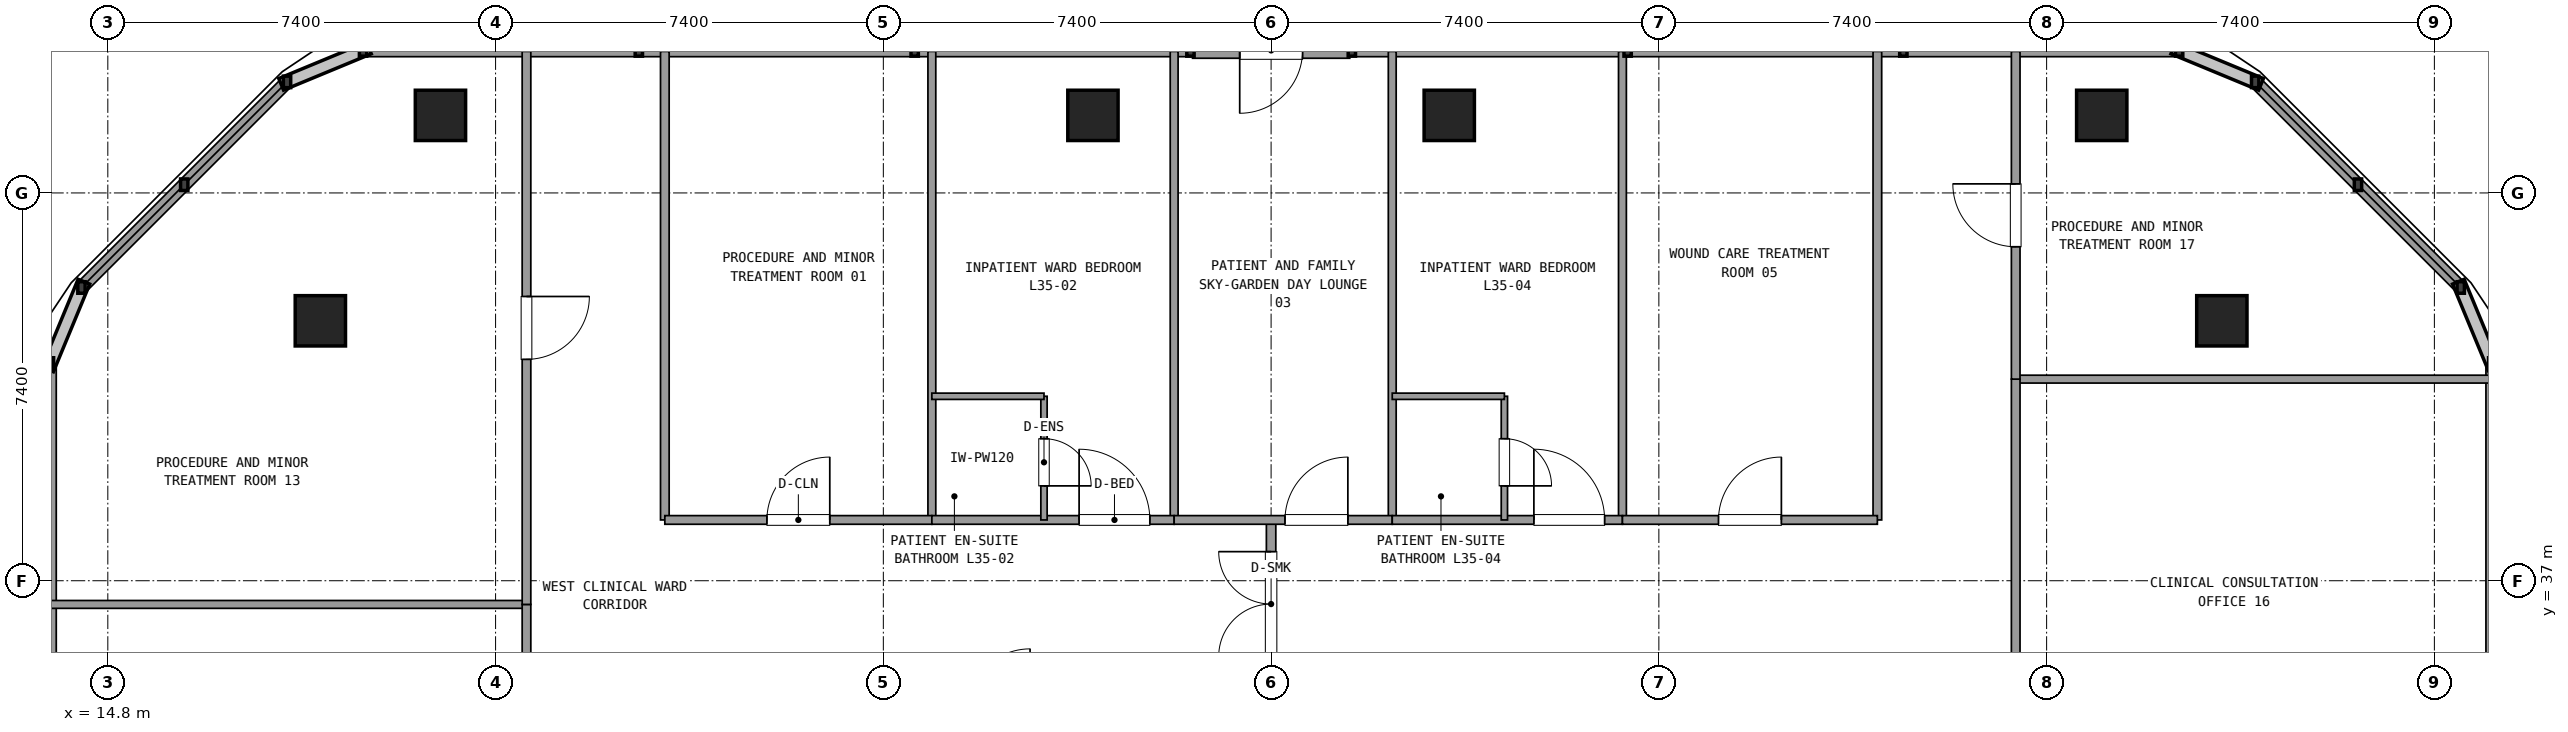
"""IFC4 building model, lengths in metres.
Left out: names, types, materials, properties, quantities, classifications, styles, units other than length and angle.
Written with IfcOpenShell. Run it as: python <this file> out.ifc"""

import sys

from ifc_helpers import new_model, si_unit, direction, frame, frame_2d, origin, origin_2d, place, context, subcontext, project, spatial, rectangle, extrude, element, fill, save


model = new_model("IFC4")
c1 = context("Model", 3, precision=1e-05, world=origin(), true_north=direction((0.0, 1.0)))
c2 = subcontext(c1, "Body", "Model", "MODEL_VIEW")
j1 = project(units=[si_unit("LENGTHUNIT", "METRE"), si_unit("PLANEANGLEUNIT", "RADIAN")], contexts=[c1])
p1 = place(None, origin())
s1 = spatial("IfcSite", under=j1, at=p1, CompositionType="ELEMENT")
p2 = place(p1, origin())
s2 = spatial("IfcBuilding", under=s1, at=p2, CompositionType="ELEMENT")
p3 = place(p2, frame((0.0, 0.0, 138.42)))
s3 = spatial("IfcBuildingStorey", under=s2, at=p3, CompositionType="ELEMENT", Elevation=138.42)
for number, where, z_axis, x_axis in (
    (1, (55.144, 41.96, 0.0), (0.0, 0.0, 1.0), (1.0, 0.0, 0.0)),
    (2, (52.852, 45.88, 0.0), (0.0, 0.0, 1.0), (1.0, 0.0, 0.0)),
    (3, (40.4, 45.88, 0.0), (0.0, 0.0, 1.0), (1.0, 0.0, 0.0)),
    (4, (33.6, 45.88, 0.0), (0.0, 0.0, 1.0), (1.0, 0.0, 0.0)),
    (5, (21.148, 45.88, 0.0), (0.0, 0.0, 1.0), (1.0, 0.0, 0.0)),
    (6, (18.856, 41.96, 0.0), (0.0, 0.0, 1.0), (1.0, 0.0, 0.0)),
):
    element("IfcColumn", number, at=place(p3, frame(where, z_axis=z_axis, x_axis=x_axis)), inside=s3, PredefinedType="COLUMN", context=c2, shape_type="SweptSolid", body=[
        extrude(rectangle(XDim=0.96, YDim=0.96, at=origin_2d()), origin(), (0.0, 0.0, 1.0), 3.6),
    ])
p4 = place(p3, frame((60.304, 10.655, 0.0), z_axis=(0.0, 0.0, 1.0), x_axis=(0.0, 1.0, 0.0)))
e7 = element("IfcWall", 7, at=p4, inside=s3, PredefinedType="SOLIDWALL", context=c2, shape_type="SweptSolid", body=[
    extrude(rectangle(XDim=30.49, YDim=0.24, at=frame_2d((15.245, 0.0))), origin(), (0.0, 0.0, 1.0), 0.85),
])
p5 = place(p3, frame((59.703, 42.596, 0.0), z_axis=(0.0, 0.0, 1.0), x_axis=(-0.707084777957, 0.707128783731, 0.0)))
e8 = element("IfcWall", 8, at=p5, inside=s3, PredefinedType="SOLIDWALL", context=c2, shape_type="SweptSolid", body=[
    extrude(rectangle(XDim=5.548, YDim=0.24, at=frame_2d((2.774, 0.0))), origin(), (0.0, 0.0, 1.0), 0.85),
])
p6 = place(p3, frame((38.501, 47.12, 0.0), z_axis=(0.0, 0.0, 1.0), x_axis=(-1.0, 0.0, 0.0)))
e9 = element("IfcWall", 9, at=p6, inside=s3, PredefinedType="SOLIDWALL", context=c2, shape_type="SweptSolid", body=[
    extrude(rectangle(XDim=3.0, YDim=0.3, at=frame_2d((1.5, 0.0))), origin(), (0.0, 0.0, 1.0), 2.67),
])
p7 = place(p6, frame((0.9, 0.0, 0.0)))
e10 = element("IfcOpeningElement", 10, at=p7, cuts=e9, PredefinedType="OPENING", context=c2, shape_type="SweptSolid", body=[
    extrude(rectangle(XDim=1.2, YDim=2.2, at=frame_2d((0.6, 1.1))), frame((0.0, 0.16, 0.0), z_axis=(0.0, -1.0, 0.0), x_axis=(1.0, 0.0, 0.0)), (0.0, 0.0, 1.0), 0.32),
])
p8 = place(p3, frame((54.329, 47.12, 0.0), z_axis=(0.0, 0.0, 1.0), x_axis=(-1.0, 0.0, 0.0)))
e11 = element("IfcWall", 11, at=p8, inside=s3, PredefinedType="SOLIDWALL", context=c2, shape_type="SweptSolid", body=[
    extrude(rectangle(XDim=15.788, YDim=0.24, at=frame_2d((7.894, 0.0))), origin(), (0.0, 0.0, 1.0), 0.85),
])
p9 = place(p3, frame((35.461, 47.12, 0.0), z_axis=(0.0, 0.0, 1.0), x_axis=(-1.0, 0.0, 0.0)))
e12 = element("IfcWall", 12, at=p9, inside=s3, PredefinedType="SOLIDWALL", context=c2, shape_type="SweptSolid", body=[
    extrude(rectangle(XDim=15.79, YDim=0.24, at=frame_2d((7.895, 0.0))), origin(), (0.0, 0.0, 1.0), 0.85),
])
p10 = place(p3, frame((18.22, 46.519, 0.0), z_axis=(0.0, 0.0, 1.0), x_axis=(-0.707084777957, -0.707128783731, 0.0)))
e13 = element("IfcWall", 13, at=p10, inside=s3, PredefinedType="SOLIDWALL", context=c2, shape_type="SweptSolid", body=[
    extrude(rectangle(XDim=5.548, YDim=0.24, at=frame_2d((2.774, 0.0))), origin(), (0.0, 0.0, 1.0), 0.85),
])
p11 = place(p3, frame((13.696, 41.145, 0.0), z_axis=(0.0, 0.0, 1.0), x_axis=(0.0, -1.0, 0.0)))
e14 = element("IfcWall", 14, at=p11, inside=s3, PredefinedType="SOLIDWALL", context=c2, shape_type="SweptSolid", body=[
    extrude(rectangle(XDim=30.49, YDim=0.24, at=frame_2d((15.245, 0.0))), origin(), (0.0, 0.0, 1.0), 0.85),
])
p12 = place(p3, frame((37.0, 34.95, 0.0), z_axis=(0.0, 0.0, 1.0), x_axis=(0.0, 1.0, 0.0)))
e15 = element("IfcWall", 15, at=p12, inside=s3, PredefinedType="PARTITIONING", context=c2, shape_type="SweptSolid", body=[
    extrude(rectangle(XDim=3.21, YDim=0.18, at=frame_2d((1.605, 0.0))), origin(), (0.0, 0.0, 1.0), 2.61),
])
p13 = place(p12, frame((0.605, 0.0, 0.0)))
e16 = element("IfcOpeningElement", 16, at=p13, cuts=e15, PredefinedType="OPENING", context=c2, shape_type="SweptSolid", body=[
    extrude(rectangle(XDim=2.0, YDim=2.2, at=frame_2d((1.0, 1.1))), frame((0.0, 0.1, 0.0), z_axis=(0.0, -1.0, 0.0), x_axis=(1.0, 0.0, 0.0)), (0.0, 0.0, 1.0), 0.2),
])
for number, where, z_axis, x_axis in (
    (17, (25.43, 38.16, 0.0), (0.0, 0.0, 1.0), (0.0, 1.0, 0.0)),
    (18, (48.57, 38.16, 0.0), (0.0, 0.0, 1.0), (0.0, 1.0, 0.0)),
):
    element("IfcWall", number, at=place(p3, frame(where, z_axis=z_axis, x_axis=x_axis)), inside=s3, PredefinedType="PARTITIONING", context=c2, shape_type="SweptSolid", body=[
        extrude(rectangle(XDim=8.94, YDim=0.165, at=frame_2d((4.47, 0.0))), origin(), (0.0, 0.0, 1.0), 2.61),
    ])
p14 = place(p3, frame((30.526, 38.16, 0.0), z_axis=(0.0, 0.0, 1.0), x_axis=(0.0, 1.0, 0.0)))
e19 = element("IfcWall", 19, at=p14, inside=s3, PredefinedType="PARTITIONING", context=c2, shape_type="SweptSolid", body=[
    extrude(rectangle(XDim=8.94, YDim=0.15, at=frame_2d((4.47, 0.0))), origin(), (0.0, 0.0, 1.0), 2.61),
])
p15 = place(p3, frame((25.43, 38.16, 0.0), z_axis=(0.0, 0.0, 1.0), x_axis=(1.0, 0.0, 0.0)))
e20 = element("IfcWall", 20, at=p15, inside=s3, PredefinedType="PARTITIONING", context=c2, shape_type="SweptSolid", body=[
    extrude(rectangle(XDim=5.096, YDim=0.165, at=frame_2d((2.548, 0.0))), origin(), (0.0, 0.0, 1.0), 2.61),
])
p16 = place(p15, frame((1.948, 0.0, 0.0)))
e21 = element("IfcOpeningElement", 21, at=p16, cuts=e20, PredefinedType="OPENING", context=c2, shape_type="SweptSolid", body=[
    extrude(rectangle(XDim=1.2, YDim=2.15, at=frame_2d((0.6, 1.075))), frame((0.0, 0.093, 0.0), z_axis=(0.0, -1.0, 0.0), x_axis=(1.0, 0.0, 0.0)), (0.0, 0.0, 1.0), 0.185),
])
p17 = place(p3, frame((35.15, 38.16, 0.0), z_axis=(0.0, 0.0, 1.0), x_axis=(0.0, 1.0, 0.0)))
e22 = element("IfcWall", 22, at=p17, inside=s3, PredefinedType="PARTITIONING", context=c2, shape_type="SweptSolid", body=[
    extrude(rectangle(XDim=8.94, YDim=0.15, at=frame_2d((4.47, 0.0))), origin(), (0.0, 0.0, 1.0), 2.61),
])
p18 = place(p3, frame((30.526, 38.16, 0.0), z_axis=(0.0, 0.0, 1.0), x_axis=(1.0, 0.0, 0.0)))
e23 = element("IfcWall", 23, at=p18, inside=s3, PredefinedType="PARTITIONING", context=c2, shape_type="SweptSolid", body=[
    extrude(rectangle(XDim=4.624, YDim=0.165, at=frame_2d((2.312, 0.0))), origin(), (0.0, 0.0, 1.0), 2.61),
])
p19 = place(p18, frame((2.81, 0.0, 0.0)))
e24 = element("IfcOpeningElement", 24, at=p19, cuts=e23, PredefinedType="OPENING", context=c2, shape_type="SweptSolid", body=[
    extrude(rectangle(XDim=1.35, YDim=2.15, at=frame_2d((0.675, 1.075))), frame((0.0, 0.093, 0.0), z_axis=(0.0, -1.0, 0.0), x_axis=(1.0, 0.0, 0.0)), (0.0, 0.0, 1.0), 0.185),
])
p20 = place(p3, frame((32.666, 38.16, 0.0), z_axis=(0.0, 0.0, 1.0), x_axis=(0.0, 1.0, 0.0)))
e25 = element("IfcWall", 25, at=p20, inside=s3, PredefinedType="PLUMBINGWALL", context=c2, shape_type="SweptSolid", body=[
    extrude(rectangle(XDim=2.36, YDim=0.12, at=frame_2d((1.18, 0.0))), origin(), (0.0, 0.0, 1.0), 2.61),
])
p21 = place(p20, frame((0.65, 0.0, 0.0)))
e26 = element("IfcOpeningElement", 26, at=p21, cuts=e25, PredefinedType="OPENING", context=c2, shape_type="SweptSolid", body=[
    extrude(rectangle(XDim=0.9, YDim=2.1, at=frame_2d((0.45, 1.05))), frame((0.0, 0.07, 0.0), z_axis=(0.0, -1.0, 0.0), x_axis=(1.0, 0.0, 0.0)), (0.0, 0.0, 1.0), 0.14),
])
p22 = place(p3, frame((30.526, 40.52, 0.0), z_axis=(0.0, 0.0, 1.0), x_axis=(1.0, 0.0, 0.0)))
e27 = element("IfcWall", 27, at=p22, inside=s3, PredefinedType="PLUMBINGWALL", context=c2, shape_type="SweptSolid", body=[
    extrude(rectangle(XDim=2.14, YDim=0.12, at=frame_2d((1.07, 0.0))), origin(), (0.0, 0.0, 1.0), 2.61),
])
p23 = place(p3, frame((39.312, 38.16, 0.0), z_axis=(0.0, 0.0, 1.0), x_axis=(0.0, 1.0, 0.0)))
e28 = element("IfcWall", 28, at=p23, inside=s3, PredefinedType="PARTITIONING", context=c2, shape_type="SweptSolid", body=[
    extrude(rectangle(XDim=8.94, YDim=0.15, at=frame_2d((4.47, 0.0))), origin(), (0.0, 0.0, 1.0), 2.61),
])
p24 = place(p3, frame((35.15, 38.16, 0.0), z_axis=(0.0, 0.0, 1.0), x_axis=(1.0, 0.0, 0.0)))
e29 = element("IfcWall", 29, at=p24, inside=s3, PredefinedType="PARTITIONING", context=c2, shape_type="SweptSolid", body=[
    extrude(rectangle(XDim=4.162, YDim=0.165, at=frame_2d((2.081, 0.0))), origin(), (0.0, 0.0, 1.0), 2.61),
])
p25 = place(p24, frame((2.115, 0.0, 0.0)))
e30 = element("IfcOpeningElement", 30, at=p25, cuts=e29, PredefinedType="OPENING", context=c2, shape_type="SweptSolid", body=[
    extrude(rectangle(XDim=1.2, YDim=2.15, at=frame_2d((0.6, 1.075))), frame((0.0, 0.093, 0.0), z_axis=(0.0, -1.0, 0.0), x_axis=(1.0, 0.0, 0.0)), (0.0, 0.0, 1.0), 0.185),
])
p26 = place(p3, frame((43.705, 38.16, 0.0), z_axis=(0.0, 0.0, 1.0), x_axis=(0.0, 1.0, 0.0)))
e31 = element("IfcWall", 31, at=p26, inside=s3, PredefinedType="PARTITIONING", context=c2, shape_type="SweptSolid", body=[
    extrude(rectangle(XDim=8.94, YDim=0.15, at=frame_2d((4.47, 0.0))), origin(), (0.0, 0.0, 1.0), 2.61),
])
p27 = place(p3, frame((39.312, 38.16, 0.0), z_axis=(0.0, 0.0, 1.0), x_axis=(1.0, 0.0, 0.0)))
e32 = element("IfcWall", 32, at=p27, inside=s3, PredefinedType="PARTITIONING", context=c2, shape_type="SweptSolid", body=[
    extrude(rectangle(XDim=4.393, YDim=0.165, at=frame_2d((2.197, 0.0))), origin(), (0.0, 0.0, 1.0), 2.61),
])
p28 = place(p27, frame((2.703, 0.0, 0.0)))
e33 = element("IfcOpeningElement", 33, at=p28, cuts=e32, PredefinedType="OPENING", context=c2, shape_type="SweptSolid", body=[
    extrude(rectangle(XDim=1.35, YDim=2.15, at=frame_2d((0.675, 1.075))), frame((0.0, 0.093, 0.0), z_axis=(0.0, -1.0, 0.0), x_axis=(1.0, 0.0, 0.0)), (0.0, 0.0, 1.0), 0.185),
])
p29 = place(p3, frame((41.452, 38.16, 0.0), z_axis=(0.0, 0.0, 1.0), x_axis=(0.0, 1.0, 0.0)))
e34 = element("IfcWall", 34, at=p29, inside=s3, PredefinedType="PLUMBINGWALL", context=c2, shape_type="SweptSolid", body=[
    extrude(rectangle(XDim=2.36, YDim=0.12, at=frame_2d((1.18, 0.0))), origin(), (0.0, 0.0, 1.0), 2.61),
])
p30 = place(p29, frame((0.65, 0.0, 0.0)))
e35 = element("IfcOpeningElement", 35, at=p30, cuts=e34, PredefinedType="OPENING", context=c2, shape_type="SweptSolid", body=[
    extrude(rectangle(XDim=0.9, YDim=2.1, at=frame_2d((0.45, 1.05))), frame((0.0, 0.07, 0.0), z_axis=(0.0, -1.0, 0.0), x_axis=(1.0, 0.0, 0.0)), (0.0, 0.0, 1.0), 0.14),
])
p31 = place(p3, frame((39.312, 40.52, 0.0), z_axis=(0.0, 0.0, 1.0), x_axis=(1.0, 0.0, 0.0)))
e36 = element("IfcWall", 36, at=p31, inside=s3, PredefinedType="PLUMBINGWALL", context=c2, shape_type="SweptSolid", body=[
    extrude(rectangle(XDim=2.14, YDim=0.12, at=frame_2d((1.07, 0.0))), origin(), (0.0, 0.0, 1.0), 2.61),
])
p32 = place(p3, frame((43.705, 38.16, 0.0), z_axis=(0.0, 0.0, 1.0), x_axis=(1.0, 0.0, 0.0)))
e37 = element("IfcWall", 37, at=p32, inside=s3, PredefinedType="PARTITIONING", context=c2, shape_type="SweptSolid", body=[
    extrude(rectangle(XDim=4.865, YDim=0.165, at=frame_2d((2.433, 0.0))), origin(), (0.0, 0.0, 1.0), 2.61),
])
p33 = place(p32, frame((1.833, 0.0, 0.0)))
e38 = element("IfcOpeningElement", 38, at=p33, cuts=e37, PredefinedType="OPENING", context=c2, shape_type="SweptSolid", body=[
    extrude(rectangle(XDim=1.2, YDim=2.15, at=frame_2d((0.6, 1.075))), frame((0.0, 0.093, 0.0), z_axis=(0.0, -1.0, 0.0), x_axis=(1.0, 0.0, 0.0)), (0.0, 0.0, 1.0), 0.185),
])
p34 = place(p3, frame((22.79, 36.548, 0.0), z_axis=(0.0, 0.0, 1.0), x_axis=(-1.0, 0.0, 0.0)))
e39 = element("IfcWall", 39, at=p34, inside=s3, PredefinedType="PARTITIONING", context=c2, shape_type="SweptSolid", body=[
    extrude(rectangle(XDim=9.074, YDim=0.15, at=frame_2d((4.537, 0.0))), origin(), (0.0, 0.0, 1.0), 2.61),
])
p35 = place(p3, frame((22.79, 27.56, 0.0), z_axis=(0.0, 0.0, 1.0), x_axis=(0.0, 1.0, 0.0)))
e40 = element("IfcWall", 40, at=p35, inside=s3, PredefinedType="PARTITIONING", context=c2, shape_type="SweptSolid", body=[
    extrude(rectangle(XDim=8.988, YDim=0.165, at=frame_2d((4.494, 0.0))), origin(), (0.0, 0.0, 1.0), 2.61),
])
p36 = place(p35, frame((3.894, 0.0, 0.0)))
e41 = element("IfcOpeningElement", 41, at=p36, cuts=e40, PredefinedType="OPENING", context=c2, shape_type="SweptSolid", body=[
    extrude(rectangle(XDim=1.2, YDim=2.15, at=frame_2d((0.6, 1.075))), frame((0.0, 0.093, 0.0), z_axis=(0.0, -1.0, 0.0), x_axis=(1.0, 0.0, 0.0)), (0.0, 0.0, 1.0), 0.185),
])
p37 = place(p3, frame((22.79, 36.548, 0.0), z_axis=(0.0, 0.0, 1.0), x_axis=(0.0, 1.0, 0.0)))
e42 = element("IfcWall", 42, at=p37, inside=s3, PredefinedType="PARTITIONING", context=c2, shape_type="SweptSolid", body=[
    extrude(rectangle(XDim=10.552, YDim=0.165, at=frame_2d((5.276, 0.0))), origin(), (0.0, 0.0, 1.0), 2.61),
])
p38 = place(p37, frame((4.676, 0.0, 0.0)))
e43 = element("IfcOpeningElement", 43, at=p38, cuts=e42, PredefinedType="OPENING", context=c2, shape_type="SweptSolid", body=[
    extrude(rectangle(XDim=1.2, YDim=2.15, at=frame_2d((0.6, 1.075))), frame((0.0, 0.093, 0.0), z_axis=(0.0, -1.0, 0.0), x_axis=(1.0, 0.0, 0.0)), (0.0, 0.0, 1.0), 0.185),
])
p39 = place(p3, frame((51.21, 40.847, 0.0), z_axis=(0.0, 0.0, 1.0), x_axis=(1.0, 0.0, 0.0)))
e44 = element("IfcWall", 44, at=p39, inside=s3, PredefinedType="PARTITIONING", context=c2, shape_type="SweptSolid", body=[
    extrude(rectangle(XDim=9.074, YDim=0.15, at=frame_2d((4.537, 0.0))), origin(), (0.0, 0.0, 1.0), 2.61),
])
p40 = place(p3, frame((51.21, 27.56, 0.0), z_axis=(0.0, 0.0, 1.0), x_axis=(0.0, 1.0, 0.0)))
e45 = element("IfcWall", 45, at=p40, inside=s3, PredefinedType="PARTITIONING", context=c2, shape_type="SweptSolid", body=[
    extrude(rectangle(XDim=13.287, YDim=0.165, at=frame_2d((6.644, 0.0))), origin(), (0.0, 0.0, 1.0), 2.61),
])
p41 = place(p40, frame((6.044, 0.0, 0.0)))
e46 = element("IfcOpeningElement", 46, at=p41, cuts=e45, PredefinedType="OPENING", context=c2, shape_type="SweptSolid", body=[
    extrude(rectangle(XDim=1.2, YDim=2.15, at=frame_2d((0.6, 1.075))), frame((0.0, 0.093, 0.0), z_axis=(0.0, -1.0, 0.0), x_axis=(1.0, 0.0, 0.0)), (0.0, 0.0, 1.0), 0.185),
])
p42 = place(p3, frame((51.21, 40.847, 0.0), z_axis=(0.0, 0.0, 1.0), x_axis=(0.0, 1.0, 0.0)))
e47 = element("IfcWall", 47, at=p42, inside=s3, PredefinedType="PARTITIONING", context=c2, shape_type="SweptSolid", body=[
    extrude(rectangle(XDim=6.253, YDim=0.165, at=frame_2d((3.126, 0.0))), origin(), (0.0, 0.0, 1.0), 2.61),
])
p43 = place(p42, frame((2.526, 0.0, 0.0)))
e48 = element("IfcOpeningElement", 48, at=p43, cuts=e47, PredefinedType="OPENING", context=c2, shape_type="SweptSolid", body=[
    extrude(rectangle(XDim=1.2, YDim=2.15, at=frame_2d((0.6, 1.075))), frame((0.0, 0.093, 0.0), z_axis=(0.0, -1.0, 0.0), x_axis=(1.0, 0.0, 0.0)), (0.0, 0.0, 1.0), 0.185),
])
p44 = place(p13, origin())
e49 = element("IfcDoor", 49, at=p44, inside=s3, OperationType="DOUBLE_DOOR_SINGLE_SWING", PredefinedType="DOOR", context=c2, shape_type="SweptSolid", body=[
    extrude(rectangle(XDim=2.0, YDim=2.2, at=frame_2d((1.0, 1.1))), frame((0.0, 0.025, 0.0), z_axis=(0.0, -1.0, 0.0), x_axis=(1.0, 0.0, 0.0)), (0.0, 0.0, 1.0), 0.05),
])
fill(e16, e49)
p45 = place(p16, origin())
e50 = element("IfcDoor", 50, at=p45, inside=s3, OperationType="SINGLE_SWING_RIGHT", PredefinedType="DOOR", context=c2, shape_type="SweptSolid", body=[
    extrude(rectangle(XDim=1.2, YDim=2.15, at=frame_2d((0.6, 1.075))), frame((0.0, 0.025, 0.0), z_axis=(0.0, -1.0, 0.0), x_axis=(1.0, 0.0, 0.0)), (0.0, 0.0, 1.0), 0.05),
])
fill(e21, e50)
p46 = place(p21, frame((0.9, 0.0, 0.0), z_axis=(0.0, 0.0, 1.0), x_axis=(-1.0, 0.0, 0.0)))
e51 = element("IfcDoor", 51, at=p46, inside=s3, OperationType="SINGLE_SWING_LEFT", PredefinedType="DOOR", context=c2, shape_type="SweptSolid", body=[
    extrude(rectangle(XDim=0.9, YDim=2.1, at=frame_2d((0.45, 1.05))), frame((0.0, 0.025, 0.0), z_axis=(0.0, -1.0, 0.0), x_axis=(1.0, 0.0, 0.0)), (0.0, 0.0, 1.0), 0.05),
])
fill(e26, e51)
p47 = place(p19, origin())
e52 = element("IfcDoor", 52, at=p47, inside=s3, OperationType="SINGLE_SWING_LEFT", PredefinedType="DOOR", context=c2, shape_type="SweptSolid", body=[
    extrude(rectangle(XDim=1.35, YDim=2.15, at=frame_2d((0.675, 1.075))), frame((0.0, 0.025, 0.0), z_axis=(0.0, -1.0, 0.0), x_axis=(1.0, 0.0, 0.0)), (0.0, 0.0, 1.0), 0.05),
])
fill(e24, e52)
p48 = place(p25, origin())
e53 = element("IfcDoor", 53, at=p48, inside=s3, OperationType="SINGLE_SWING_RIGHT", PredefinedType="DOOR", context=c2, shape_type="SweptSolid", body=[
    extrude(rectangle(XDim=1.2, YDim=2.15, at=frame_2d((0.6, 1.075))), frame((0.0, 0.025, 0.0), z_axis=(0.0, -1.0, 0.0), x_axis=(1.0, 0.0, 0.0)), (0.0, 0.0, 1.0), 0.05),
])
fill(e30, e53)
p49 = place(p30, frame((0.9, 0.0, 0.0), z_axis=(0.0, 0.0, 1.0), x_axis=(-1.0, 0.0, 0.0)))
e54 = element("IfcDoor", 54, at=p49, inside=s3, OperationType="SINGLE_SWING_LEFT", PredefinedType="DOOR", context=c2, shape_type="SweptSolid", body=[
    extrude(rectangle(XDim=0.9, YDim=2.1, at=frame_2d((0.45, 1.05))), frame((0.0, 0.025, 0.0), z_axis=(0.0, -1.0, 0.0), x_axis=(1.0, 0.0, 0.0)), (0.0, 0.0, 1.0), 0.05),
])
fill(e35, e54)
p50 = place(p28, origin())
e55 = element("IfcDoor", 55, at=p50, inside=s3, OperationType="SINGLE_SWING_LEFT", PredefinedType="DOOR", context=c2, shape_type="SweptSolid", body=[
    extrude(rectangle(XDim=1.35, YDim=2.15, at=frame_2d((0.675, 1.075))), frame((0.0, 0.025, 0.0), z_axis=(0.0, -1.0, 0.0), x_axis=(1.0, 0.0, 0.0)), (0.0, 0.0, 1.0), 0.05),
])
fill(e33, e55)
p51 = place(p33, origin())
e56 = element("IfcDoor", 56, at=p51, inside=s3, OperationType="SINGLE_SWING_RIGHT", PredefinedType="DOOR", context=c2, shape_type="SweptSolid", body=[
    extrude(rectangle(XDim=1.2, YDim=2.15, at=frame_2d((0.6, 1.075))), frame((0.0, 0.025, 0.0), z_axis=(0.0, -1.0, 0.0), x_axis=(1.0, 0.0, 0.0)), (0.0, 0.0, 1.0), 0.05),
])
fill(e38, e56)
p52 = place(p38, frame((1.2, 0.0, 0.0), z_axis=(0.0, 0.0, 1.0), x_axis=(-1.0, 0.0, 0.0)))
e57 = element("IfcDoor", 57, at=p52, inside=s3, OperationType="SINGLE_SWING_RIGHT", PredefinedType="DOOR", context=c2, shape_type="SweptSolid", body=[
    extrude(rectangle(XDim=1.2, YDim=2.15, at=frame_2d((0.6, 1.075))), frame((0.0, 0.025, 0.0), z_axis=(0.0, -1.0, 0.0), x_axis=(1.0, 0.0, 0.0)), (0.0, 0.0, 1.0), 0.05),
])
fill(e43, e57)
p53 = place(p43, origin())
e58 = element("IfcDoor", 58, at=p53, inside=s3, OperationType="SINGLE_SWING_RIGHT", PredefinedType="DOOR", context=c2, shape_type="SweptSolid", body=[
    extrude(rectangle(XDim=1.2, YDim=2.15, at=frame_2d((0.6, 1.075))), frame((0.0, 0.025, 0.0), z_axis=(0.0, -1.0, 0.0), x_axis=(1.0, 0.0, 0.0)), (0.0, 0.0, 1.0), 0.05),
])
fill(e48, e58)
save(model, sys.argv[1])
